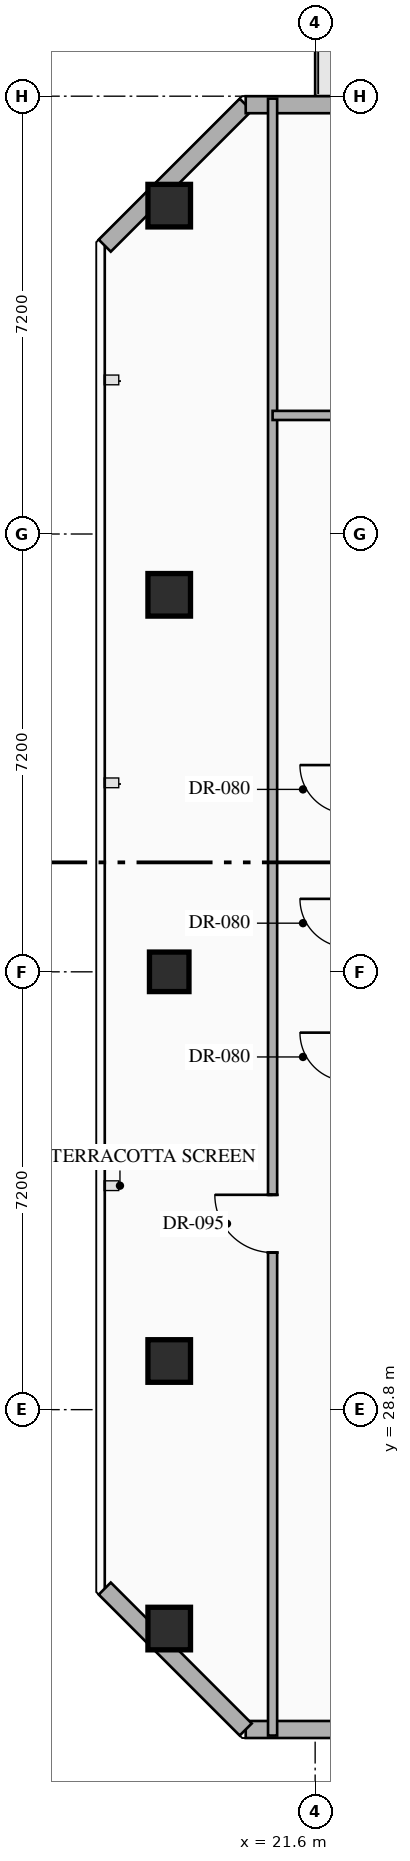
"""IFC4 building model, lengths in metres.
Left out: names, types, materials, properties, quantities, classifications, styles, units other than length and angle.
Written with IfcOpenShell. Run it as: python <this file> out.ifc"""

import sys

from ifc_helpers import new_model, si_unit, direction, frame, frame_2d, origin, origin_2d, place, context, subcontext, project, spatial, rectangle, hollow_rectangle, extrude, element, fill, save


model = new_model("IFC4")
c1 = context("Model", 3, precision=1e-05, world=origin(), true_north=direction((0.0, 1.0)))
c2 = subcontext(c1, "Body", "Model", "MODEL_VIEW")
j1 = project(units=[si_unit("LENGTHUNIT", "METRE"), si_unit("PLANEANGLEUNIT", "RADIAN")], contexts=[c1])
p1 = place(None, origin())
s1 = spatial("IfcSite", under=j1, at=p1, CompositionType="ELEMENT")
p2 = place(p1, origin())
s2 = spatial("IfcBuilding", under=s1, at=p2, CompositionType="ELEMENT")
p3 = place(p2, frame((0.0, 0.0, 220.35)))
s3 = spatial("IfcBuildingStorey", under=s2, at=p3, CompositionType="ELEMENT", Elevation=220.35)
for number, where, z_axis, x_axis in (
    (1, (19.2, 48.6, 0.0), (0.0, 0.0, 1.0), (1.0, 0.0, 0.0)),
    (2, (19.2, 25.2, 0.0), (0.0, 0.0, 1.0), (1.0, 0.0, 0.0)),
    (3, (19.2, 29.6, 0.0), (0.0, 0.0, 1.0), (1.0, 0.0, 0.0)),
    (4, (19.2, 42.2, 0.0), (0.0, 0.0, 1.0), (1.0, 0.0, 0.0)),
):
    element("IfcColumn", number, at=place(p3, frame(where, z_axis=z_axis, x_axis=x_axis)), inside=s3, PredefinedType="COLUMN", context=c2, shape_type="SweptSolid", body=[
        extrude(hollow_rectangle(XDim=0.7, YDim=0.7, WallThickness=0.028, at=origin_2d()), origin(), (0.0, 0.0, 1.0), 3.6),
    ])
p4 = place(p3, frame((19.2, 36.0, 0.0), z_axis=(0.0, 0.0, 1.0), x_axis=(1.0, 0.0, 0.0)))
e5 = element("IfcColumn", 5, at=p4, inside=s3, PredefinedType="COLUMN", context=c2, shape_type="SweptSolid", body=[
    extrude(hollow_rectangle(XDim=0.65, YDim=0.65, WallThickness=0.025, at=origin_2d()), origin(), (0.0, 0.0, 1.0), 3.6),
])
p5 = place(p3, frame((25.247, 23.54, 0.0), z_axis=(0.0, 0.0, 1.0), x_axis=(-1.0, 0.0, 0.0)))
e6 = element("IfcWall", 6, at=p5, inside=s3, PredefinedType="STANDARD", context=c2, shape_type="SweptSolid", body=[
    extrude(rectangle(XDim=4.789, YDim=0.28, at=frame_2d((2.395, 0.0))), origin(), (0.0, 0.0, 1.0), 3.35),
])
p6 = place(p3, frame((20.458, 23.54, 0.0), z_axis=(0.0, 0.0, 1.0), x_axis=(-0.707144017911, 0.707069542501, 0.0)))
e7 = element("IfcWall", 7, at=p6, inside=s3, PredefinedType="STANDARD", context=c2, shape_type="SweptSolid", body=[
    extrude(rectangle(XDim=3.278, YDim=0.28, at=frame_2d((1.639, 0.0))), origin(), (0.0, 0.0, 1.0), 3.35),
])
p7 = place(p3, frame((18.14, 47.942, 0.0), z_axis=(0.0, 0.0, 1.0), x_axis=(0.707106781187, 0.707106781187, 0.0)))
e8 = element("IfcWall", 8, at=p7, inside=s3, PredefinedType="STANDARD", context=c2, shape_type="SweptSolid", body=[
    extrude(rectangle(XDim=3.278, YDim=0.28, at=frame_2d((1.639, 0.0))), origin(), (0.0, 0.0, 1.0), 3.35),
])
p8 = place(p3, frame((20.458, 50.26, 0.0), z_axis=(0.0, 0.0, 1.0), x_axis=(1.0, 0.0, 0.0)))
e9 = element("IfcWall", 9, at=p8, inside=s3, PredefinedType="STANDARD", context=c2, shape_type="SweptSolid", body=[
    extrude(rectangle(XDim=22.084, YDim=0.28, at=frame_2d((11.042, 0.0))), origin(), (0.0, 0.0, 1.0), 3.35),
])
p9 = place(p8, frame((2.1, 0.0, 0.0)))
e10 = element("IfcOpeningElement", 10, at=p9, cuts=e9, PredefinedType="OPENING", context=c2, shape_type="SweptSolid", body=[
    extrude(rectangle(XDim=1.1, YDim=2.2, at=frame_2d((0.55, 1.1))), frame((0.0, 0.15, 0.0), z_axis=(0.0, -1.0, 0.0), x_axis=(1.0, 0.0, 0.0)), (0.0, 0.0, 1.0), 0.3),
])
p10 = place(p8, frame((15.663, 0.0, 0.85)))
e11 = element("IfcOpeningElement", 11, at=p10, cuts=e9, PredefinedType="OPENING", context=c2, shape_type="SweptSolid", body=[
    extrude(rectangle(XDim=1.8, YDim=2.1, at=frame_2d((0.9, 1.05))), frame((0.0, 0.15, 0.0), z_axis=(0.0, -1.0, 0.0), x_axis=(1.0, 0.0, 0.0)), (0.0, 0.0, 1.0), 0.3),
])
p11 = place(p3, frame((20.9, 23.44, 0.0), z_axis=(0.0, 0.0, 1.0), x_axis=(0.0, 1.0, 0.0)))
e12 = element("IfcWall", 12, at=p11, inside=s3, PredefinedType="PARTITIONING", context=c2, shape_type="SweptSolid", body=[
    extrude(rectangle(XDim=26.92, YDim=0.15, at=frame_2d((13.46, 0.0))), origin(), (0.0, 0.0, 1.0), 3.35),
])
p12 = place(p11, frame((7.943, 0.0, 0.0)))
e13 = element("IfcOpeningElement", 13, at=p12, cuts=e12, PredefinedType="OPENING", context=c2, shape_type="SweptSolid", body=[
    extrude(rectangle(XDim=0.95, YDim=2.15, at=frame_2d((0.475, 1.075))), frame((0.0, 0.085, 0.0), z_axis=(0.0, -1.0, 0.0), x_axis=(1.0, 0.0, 0.0)), (0.0, 0.0, 1.0), 0.17),
])
p13 = place(p3, frame((20.9, 45.15, 0.0), z_axis=(0.0, 0.0, 1.0), x_axis=(1.0, 0.0, 0.0)))
e14 = element("IfcWall", 14, at=p13, inside=s3, PredefinedType="PARTITIONING", context=c2, shape_type="SweptSolid", body=[
    extrude(rectangle(XDim=24.06, YDim=0.15, at=frame_2d((12.03, 0.0))), origin(), (0.0, 0.0, 1.0), 3.35),
])
p14 = place(p13, frame((9.32, 0.0, 0.0)))
e15 = element("IfcOpeningElement", 15, at=p14, cuts=e14, PredefinedType="OPENING", context=c2, shape_type="SweptSolid", body=[
    extrude(rectangle(XDim=0.95, YDim=2.15, at=frame_2d((0.475, 1.075))), frame((0.0, 0.085, 0.0), z_axis=(0.0, -1.0, 0.0), x_axis=(1.0, 0.0, 0.0)), (0.0, 0.0, 1.0), 0.17),
])
p15 = place(p12, origin())
e16 = element("IfcDoor", 16, at=p15, inside=s3, OperationType="SINGLE_SWING_RIGHT", PredefinedType="DOOR", context=c2, shape_type="SweptSolid", body=[
    extrude(rectangle(XDim=0.95, YDim=2.15, at=frame_2d((0.475, 1.075))), frame((0.0, 0.025, 0.0), z_axis=(0.0, -1.0, 0.0), x_axis=(1.0, 0.0, 0.0)), (0.0, 0.0, 1.0), 0.05),
])
fill(e13, e16)
save(model, sys.argv[1])
